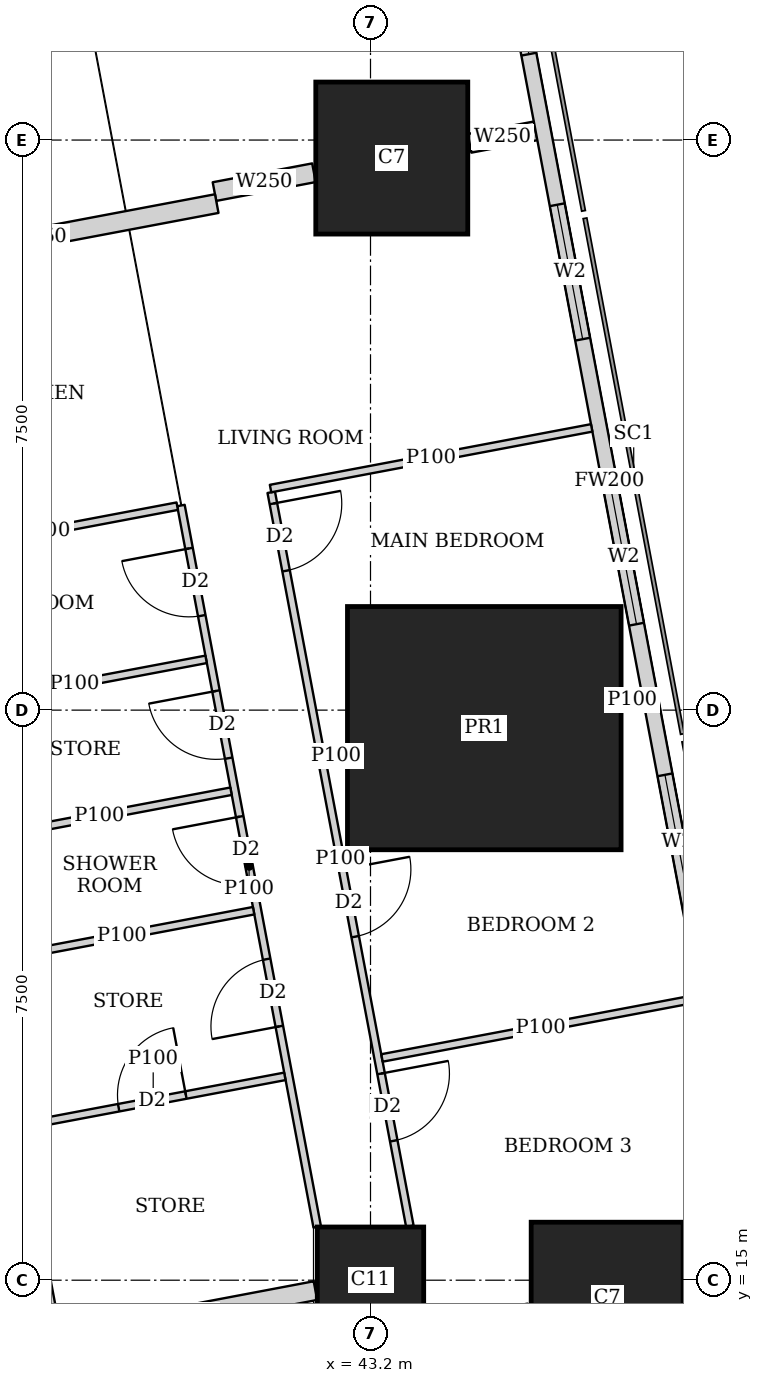
"""IFC4 building model, lengths in metres.
Left out: names, types, materials, properties, quantities, classifications, styles, units other than length and angle.
Written with IfcOpenShell. Run it as: python <this file> out.ifc"""

import sys

from ifc_helpers import new_model, si_unit, direction, frame, frame_2d, origin, origin_2d, place, context, subcontext, project, spatial, rectangle, extrude, element, fill, save


model = new_model("IFC4")
c1 = context("Model", 3, precision=1e-05, world=origin(), true_north=direction((0.0, 1.0)))
c2 = subcontext(c1, "Body", "Model", "MODEL_VIEW")
j1 = project(units=[si_unit("LENGTHUNIT", "METRE"), si_unit("PLANEANGLEUNIT", "RADIAN")], contexts=[c1])
p1 = place(None, origin())
s1 = spatial("IfcSite", under=j1, at=p1, CompositionType="ELEMENT")
p2 = place(p1, origin())
s2 = spatial("IfcBuilding", under=s1, at=p2, CompositionType="ELEMENT")
p3 = place(p2, frame((0.0, 0.0, 274.1)))
s3 = spatial("IfcBuildingStorey", under=s2, at=p3, CompositionType="ELEMENT", Elevation=274.1)
p4 = place(p3, frame((43.2, 15.0, 0.0), z_axis=(0.0, 0.0, 1.0), x_axis=(1.0, 0.0, 0.0)))
e1 = element("IfcColumn", 1, at=p4, inside=s3, PredefinedType="COLUMN", context=c2, shape_type="SweptSolid", body=[
    extrude(rectangle(XDim=1.4, YDim=1.4, at=origin_2d()), origin(), (0.0, 0.0, 1.0), 3.75),
])
p5 = place(p3, frame((46.314, 14.763, 0.0), z_axis=(0.0, 0.0, 1.0), x_axis=(1.0, 0.0, 0.0)))
e2 = element("IfcColumn", 2, at=p5, inside=s3, PredefinedType="COLUMN", context=c2, shape_type="SweptSolid", body=[
    extrude(rectangle(XDim=2.0, YDim=2.0, at=origin_2d()), origin(), (0.0, 0.0, 1.0), 3.75),
])
p6 = place(p3, frame((44.697, 22.263, 0.0), z_axis=(0.0, 0.0, 1.0), x_axis=(1.0, 0.0, 0.0)))
e3 = element("IfcColumn", 3, at=p6, inside=s3, PredefinedType="COLUMN", context=c2, shape_type="SweptSolid", body=[
    extrude(rectangle(XDim=3.6, YDim=3.2, at=origin_2d()), origin(), (0.0, 0.0, 1.0), 3.75),
])
p7 = place(p3, frame((43.48, 29.763, 0.0), z_axis=(0.0, 0.0, 1.0), x_axis=(1.0, 0.0, 0.0)))
e4 = element("IfcColumn", 4, at=p7, inside=s3, PredefinedType="COLUMN", context=c2, shape_type="SweptSolid", body=[
    extrude(rectangle(XDim=2.0, YDim=2.0, at=origin_2d()), origin(), (0.0, 0.0, 1.0), 3.75),
])
p8 = place(p3, frame((49.684, 7.832, 0.0), z_axis=(0.0, 0.0, 1.0), x_axis=(-0.185616669694, 0.982622232565, 0.0)))
e5 = element("IfcWall", 5, at=p8, inside=s3, PredefinedType="SOLIDWALL", context=c2, shape_type="SweptSolid", body=[
    extrude(rectangle(XDim=36.0, YDim=0.2, at=frame_2d((18.0, 0.0))), origin(), (0.0, 0.0, 1.0), 3.5),
])
p9 = place(p8, frame((2.518, 0.0, 0.9)))
e6 = element("IfcOpeningElement", 6, at=p9, cuts=e5, PredefinedType="OPENING", context=c2, shape_type="SweptSolid", body=[
    extrude(rectangle(XDim=2.4, YDim=1.5, at=frame_2d((1.2, 0.75))), frame((0.0, 0.11, 0.0), z_axis=(0.0, -1.0, 0.0), x_axis=(1.0, 0.0, 0.0)), (0.0, 0.0, 1.0), 0.22),
])
p10 = place(p8, frame((8.444, 0.0, 0.9)))
e7 = element("IfcOpeningElement", 7, at=p10, cuts=e5, PredefinedType="OPENING", context=c2, shape_type="SweptSolid", body=[
    extrude(rectangle(XDim=1.8, YDim=1.5, at=frame_2d((0.9, 0.75))), frame((0.0, 0.11, 0.0), z_axis=(0.0, -1.0, 0.0), x_axis=(1.0, 0.0, 0.0)), (0.0, 0.0, 1.0), 0.22),
])
p11 = place(p8, frame((12.261, 0.0, 0.9)))
e8 = element("IfcOpeningElement", 8, at=p11, cuts=e5, PredefinedType="OPENING", context=c2, shape_type="SweptSolid", body=[
    extrude(rectangle(XDim=1.8, YDim=1.5, at=frame_2d((0.9, 0.75))), frame((0.0, 0.11, 0.0), z_axis=(0.0, -1.0, 0.0), x_axis=(1.0, 0.0, 0.0)), (0.0, 0.0, 1.0), 0.22),
])
p12 = place(p8, frame((16.078, 0.0, 0.9)))
e9 = element("IfcOpeningElement", 9, at=p12, cuts=e5, PredefinedType="OPENING", context=c2, shape_type="SweptSolid", body=[
    extrude(rectangle(XDim=1.8, YDim=1.5, at=frame_2d((0.9, 0.75))), frame((0.0, 0.11, 0.0), z_axis=(0.0, -1.0, 0.0), x_axis=(1.0, 0.0, 0.0)), (0.0, 0.0, 1.0), 0.22),
])
p13 = place(p8, frame((19.894, 0.0, 0.9)))
e10 = element("IfcOpeningElement", 10, at=p13, cuts=e5, PredefinedType="OPENING", context=c2, shape_type="SweptSolid", body=[
    extrude(rectangle(XDim=1.8, YDim=1.5, at=frame_2d((0.9, 0.75))), frame((0.0, 0.11, 0.0), z_axis=(0.0, -1.0, 0.0), x_axis=(1.0, 0.0, 0.0)), (0.0, 0.0, 1.0), 0.22),
])
p14 = place(p8, frame((23.71, 0.0, 0.9)))
e11 = element("IfcOpeningElement", 11, at=p14, cuts=e5, PredefinedType="OPENING", context=c2, shape_type="SweptSolid", body=[
    extrude(rectangle(XDim=1.8, YDim=1.5, at=frame_2d((0.9, 0.75))), frame((0.0, 0.11, 0.0), z_axis=(0.0, -1.0, 0.0), x_axis=(1.0, 0.0, 0.0)), (0.0, 0.0, 1.0), 0.22),
])
p15 = place(p8, frame((27.526, 0.0, 0.9)))
e12 = element("IfcOpeningElement", 12, at=p15, cuts=e5, PredefinedType="OPENING", context=c2, shape_type="SweptSolid", body=[
    extrude(rectangle(XDim=1.8, YDim=1.5, at=frame_2d((0.9, 0.75))), frame((0.0, 0.11, 0.0), z_axis=(0.0, -1.0, 0.0), x_axis=(1.0, 0.0, 0.0)), (0.0, 0.0, 1.0), 0.22),
])
p16 = place(p8, frame((32.046, 0.0, 0.9)))
e13 = element("IfcOpeningElement", 13, at=p16, cuts=e5, PredefinedType="OPENING", context=c2, shape_type="SweptSolid", body=[
    extrude(rectangle(XDim=1.8, YDim=1.5, at=frame_2d((0.9, 0.75))), frame((0.0, 0.11, 0.0), z_axis=(0.0, -1.0, 0.0), x_axis=(1.0, 0.0, 0.0)), (0.0, 0.0, 1.0), 0.22),
])
p17 = place(p3, frame((33.781, 42.186, 0.0), z_axis=(0.0, 0.0, 1.0), x_axis=(0.185593518645, -0.9826266055, 0.0)))
e14 = element("IfcWall", 14, at=p17, inside=s3, PredefinedType="SOLIDWALL", context=c2, shape_type="SweptSolid", body=[
    extrude(rectangle(XDim=35.961, YDim=0.15, at=frame_2d((17.98, 0.0))), origin(), (0.0, 0.0, 1.0), 2.5),
])
p18 = place(p17, frame((11.76, 0.0, 0.0)))
e15 = element("IfcOpeningElement", 15, at=p18, cuts=e14, PredefinedType="OPENING", context=c2, shape_type="SweptSolid", body=[
    extrude(rectangle(XDim=1.0, YDim=2.1, at=frame_2d((0.5, 1.05))), frame((0.0, 0.085, 0.0), z_axis=(0.0, -1.0, 0.0), x_axis=(1.0, 0.0, 0.0)), (0.0, 0.0, 1.0), 0.17),
])
p19 = place(p17, frame((15.576, 0.0, 0.0)))
e16 = element("IfcOpeningElement", 16, at=p19, cuts=e14, PredefinedType="OPENING", context=c2, shape_type="SweptSolid", body=[
    extrude(rectangle(XDim=1.0, YDim=2.1, at=frame_2d((0.5, 1.05))), frame((0.0, 0.085, 0.0), z_axis=(0.0, -1.0, 0.0), x_axis=(1.0, 0.0, 0.0)), (0.0, 0.0, 1.0), 0.17),
])
p20 = place(p17, frame((30.502, 0.0, 0.0)))
e17 = element("IfcOpeningElement", 17, at=p20, cuts=e14, PredefinedType="OPENING", context=c2, shape_type="SweptSolid", body=[
    extrude(rectangle(XDim=1.0, YDim=2.1, at=frame_2d((0.5, 1.05))), frame((0.0, 0.085, 0.0), z_axis=(0.0, -1.0, 0.0), x_axis=(1.0, 0.0, 0.0)), (0.0, 0.0, 1.0), 0.17),
])
p21 = place(p3, frame((41.894, 25.366, 0.0), z_axis=(0.0, 0.0, 1.0), x_axis=(0.185612905165, -0.982622943675, 0.0)))
e18 = element("IfcWall", 18, at=p21, inside=s3, PredefinedType="PARTITIONING", context=c2, shape_type="SweptSolid", body=[
    extrude(rectangle(XDim=9.827, YDim=0.1, at=frame_2d((4.913, 0.0))), origin(), (0.0, 0.0, 1.0), 2.5),
])
p22 = place(p21, frame((0.151, 0.0, 0.0)))
e19 = element("IfcOpeningElement", 19, at=p22, cuts=e18, PredefinedType="OPENING", context=c2, shape_type="SweptSolid", body=[
    extrude(rectangle(XDim=0.9, YDim=2.1, at=frame_2d((0.45, 1.05))), frame((0.0, 0.06, 0.0), z_axis=(0.0, -1.0, 0.0), x_axis=(1.0, 0.0, 0.0)), (0.0, 0.0, 1.0), 0.12),
])
p23 = place(p21, frame((5.05, 0.0, 0.0)))
e20 = element("IfcOpeningElement", 20, at=p23, cuts=e18, PredefinedType="OPENING", context=c2, shape_type="SweptSolid", body=[
    extrude(rectangle(XDim=0.9, YDim=2.1, at=frame_2d((0.45, 1.05))), frame((0.0, 0.06, 0.0), z_axis=(0.0, -1.0, 0.0), x_axis=(1.0, 0.0, 0.0)), (0.0, 0.0, 1.0), 0.12),
])
p24 = place(p21, frame((7.783, 0.0, 0.0)))
e21 = element("IfcOpeningElement", 21, at=p24, cuts=e18, PredefinedType="OPENING", context=c2, shape_type="SweptSolid", body=[
    extrude(rectangle(XDim=0.9, YDim=2.1, at=frame_2d((0.45, 1.05))), frame((0.0, 0.06, 0.0), z_axis=(0.0, -1.0, 0.0), x_axis=(1.0, 0.0, 0.0)), (0.0, 0.0, 1.0), 0.12),
])
p25 = place(p3, frame((40.706, 25.192, 0.0), z_axis=(0.0, 0.0, 1.0), x_axis=(0.185629824463, -0.982619747547, 0.0)))
e22 = element("IfcWall", 22, at=p25, inside=s3, PredefinedType="PARTITIONING", context=c2, shape_type="SweptSolid", body=[
    extrude(rectangle(XDim=9.659, YDim=0.1, at=frame_2d((4.83, 0.0))), origin(), (0.0, 0.0, 1.0), 2.5),
])
p26 = place(p25, frame((0.575, 0.0, 0.0)))
e23 = element("IfcOpeningElement", 23, at=p26, cuts=e22, PredefinedType="OPENING", context=c2, shape_type="SweptSolid", body=[
    extrude(rectangle(XDim=0.9, YDim=2.1, at=frame_2d((0.45, 1.05))), frame((0.0, 0.06, 0.0), z_axis=(0.0, -1.0, 0.0), x_axis=(1.0, 0.0, 0.0)), (0.0, 0.0, 1.0), 0.12),
])
p27 = place(p25, frame((4.166, 0.0, 0.0)))
e24 = element("IfcOpeningElement", 24, at=p27, cuts=e22, PredefinedType="OPENING", context=c2, shape_type="SweptSolid", body=[
    extrude(rectangle(XDim=0.9, YDim=2.1, at=frame_2d((0.45, 1.05))), frame((0.0, 0.06, 0.0), z_axis=(0.0, -1.0, 0.0), x_axis=(1.0, 0.0, 0.0)), (0.0, 0.0, 1.0), 0.12),
])
p28 = place(p25, frame((2.483, 0.0, 0.0)))
e25 = element("IfcOpeningElement", 25, at=p28, cuts=e22, PredefinedType="OPENING", context=c2, shape_type="SweptSolid", body=[
    extrude(rectangle(XDim=0.9, YDim=2.1, at=frame_2d((0.45, 1.05))), frame((0.0, 0.06, 0.0), z_axis=(0.0, -1.0, 0.0), x_axis=(1.0, 0.0, 0.0)), (0.0, 0.0, 1.0), 0.12),
])
p29 = place(p25, frame((6.074, 0.0, 0.0)))
e26 = element("IfcOpeningElement", 26, at=p29, cuts=e22, PredefinedType="OPENING", context=c2, shape_type="SweptSolid", body=[
    extrude(rectangle(XDim=0.9, YDim=2.1, at=frame_2d((0.45, 1.05))), frame((0.0, 0.06, 0.0), z_axis=(0.0, -1.0, 0.0), x_axis=(1.0, 0.0, 0.0)), (0.0, 0.0, 1.0), 0.12),
])
p30 = place(p3, frame((46.11, 26.213, 0.0), z_axis=(0.0, 0.0, 1.0), x_axis=(-0.982633535512, -0.185556823879, 0.0)))
e27 = element("IfcWall", 27, at=p30, inside=s3, PredefinedType="PARTITIONING", context=c2, shape_type="SweptSolid", body=[
    extrude(rectangle(XDim=4.3, YDim=0.1, at=frame_2d((2.15, 0.0))), origin(), (0.0, 0.0, 1.0), 2.5),
])
p31 = place(p3, frame((46.782, 22.657, 0.0), z_axis=(0.0, 0.0, 1.0), x_axis=(-0.982574553168, -0.185868898601, 0.0)))
e28 = element("IfcWall", 28, at=p31, inside=s3, PredefinedType="PARTITIONING", context=c2, shape_type="SweptSolid", body=[
    extrude(rectangle(XDim=0.28, YDim=0.1, at=frame_2d((0.14, 0.0))), origin(), (0.0, 0.0, 1.0), 3.5),
])
p32 = place(p3, frame((42.887, 21.921, 0.0), z_axis=(0.0, 0.0, 1.0), x_axis=(-0.982688058078, -0.185267861514, 0.0)))
e29 = element("IfcWall", 29, at=p32, inside=s3, PredefinedType="PARTITIONING", context=c2, shape_type="SweptSolid", body=[
    extrude(rectangle(XDim=0.286, YDim=0.1, at=frame_2d((0.143, 0.0))), origin(), (0.0, 0.0, 1.0), 2.5),
])
p33 = place(p3, frame((47.527, 18.712, 0.0), z_axis=(0.0, 0.0, 1.0), x_axis=(-0.982665405803, -0.185387972203, 0.0)))
e30 = element("IfcWall", 30, at=p33, inside=s3, PredefinedType="PARTITIONING", context=c2, shape_type="SweptSolid", body=[
    extrude(rectangle(XDim=4.25, YDim=0.1, at=frame_2d((2.125, 0.0))), origin(), (0.0, 0.0, 1.0), 2.5),
])
p34 = place(p3, frame((40.657, 25.183, 0.0), z_axis=(0.0, 0.0, 1.0), x_axis=(-0.982585626838, -0.185810349366, 0.0)))
e31 = element("IfcWall", 31, at=p34, inside=s3, PredefinedType="PARTITIONING", context=c2, shape_type="SweptSolid", body=[
    extrude(rectangle(XDim=3.525, YDim=0.1, at=frame_2d((1.763, 0.0))), origin(), (0.0, 0.0, 1.0), 3.5),
])
p35 = place(p3, frame((41.365, 21.433, 0.0), z_axis=(0.0, 0.0, 1.0), x_axis=(-0.982638553676, -0.185530247748, 0.0)))
e32 = element("IfcWall", 32, at=p35, inside=s3, PredefinedType="PARTITIONING", context=c2, shape_type="SweptSolid", body=[
    extrude(rectangle(XDim=3.525, YDim=0.1, at=frame_2d((1.763, 0.0))), origin(), (0.0, 0.0, 1.0), 3.5),
])
p36 = place(p3, frame((42.073, 17.682, 0.0), z_axis=(0.0, 0.0, 1.0), x_axis=(-0.98265117712, -0.185463376723, 0.0)))
e33 = element("IfcWall", 33, at=p36, inside=s3, PredefinedType="PARTITIONING", context=c2, shape_type="SweptSolid", body=[
    extrude(rectangle(XDim=3.525, YDim=0.1, at=frame_2d((1.763, 0.0))), origin(), (0.0, 0.0, 1.0), 3.5),
])
p37 = place(p36, frame((1.325, 0.0, 0.0)))
e34 = element("IfcOpeningElement", 34, at=p37, cuts=e33, PredefinedType="OPENING", context=c2, shape_type="SweptSolid", body=[
    extrude(rectangle(XDim=0.9, YDim=2.1, at=frame_2d((0.45, 1.05))), frame((0.0, 0.06, 0.0), z_axis=(0.0, -1.0, 0.0), x_axis=(1.0, 0.0, 0.0)), (0.0, 0.0, 1.0), 0.12),
])
p38 = place(p3, frame((41.037, 23.168, 0.0), z_axis=(0.0, 0.0, 1.0), x_axis=(-0.982638553676, -0.185530247748, 0.0)))
e35 = element("IfcWall", 35, at=p38, inside=s3, PredefinedType="PARTITIONING", context=c2, shape_type="SweptSolid", body=[
    extrude(rectangle(XDim=3.525, YDim=0.1, at=frame_2d((1.763, 0.0))), origin(), (0.0, 0.0, 1.0), 2.5),
])
p39 = place(p3, frame((41.662, 19.861, 0.0), z_axis=(0.0, 0.0, 1.0), x_axis=(-0.982588017646, -0.185797706064, 0.0)))
e36 = element("IfcWall", 36, at=p39, inside=s3, PredefinedType="PARTITIONING", context=c2, shape_type="SweptSolid", body=[
    extrude(rectangle(XDim=3.525, YDim=0.1, at=frame_2d((1.763, 0.0))), origin(), (0.0, 0.0, 1.0), 3.5),
])
p40 = place(p3, frame((45.372, 30.121, 0.0), z_axis=(0.0, 0.0, 1.0), x_axis=(-0.982608419258, -0.185689780017, 0.0)))
e37 = element("IfcWall", 37, at=p40, inside=s3, PredefinedType="SOLIDWALL", context=c2, shape_type="SweptSolid", body=[
    extrude(rectangle(XDim=0.884, YDim=0.25, at=frame_2d((0.442, 0.0))), origin(), (0.0, 0.0, 1.0), 3.5),
])
p41 = place(p3, frame((42.456, 29.57, 0.0), z_axis=(0.0, 0.0, 1.0), x_axis=(-0.982517742323, -0.18616897169, 0.0)))
e38 = element("IfcWall", 38, at=p41, inside=s3, PredefinedType="SOLIDWALL", context=c2, shape_type="SweptSolid", body=[
    extrude(rectangle(XDim=1.332, YDim=0.25, at=frame_2d((0.666, 0.0))), origin(), (0.0, 0.0, 1.0), 2.5),
])
p42 = place(p3, frame((41.177, 29.164, 0.0), z_axis=(0.0, 0.0, 1.0), x_axis=(-0.982642846239, -0.185507511263, 0.0)))
e39 = element("IfcWall", 39, at=p42, inside=s3, PredefinedType="SOLIDWALL", context=c2, shape_type="SweptSolid", body=[
    extrude(rectangle(XDim=4.776, YDim=0.25, at=frame_2d((2.388, 0.0))), origin(), (0.0, 0.0, 1.0), 2.5),
])
p43 = place(p3, frame((42.476, 14.863, 0.0), z_axis=(0.0, 0.0, 1.0), x_axis=(-0.982603567712, -0.185715450942, 0.0)))
e40 = element("IfcWall", 40, at=p43, inside=s3, PredefinedType="SOLIDWALL", context=c2, shape_type="SweptSolid", body=[
    extrude(rectangle(XDim=3.398, YDim=0.25, at=frame_2d((1.699, 0.0))), origin(), (0.0, 0.0, 1.0), 3.5),
])
p44 = place(p11, origin())
e41 = element("IfcWindow", 41, at=p44, inside=s3, PartitioningType="SINGLE_PANEL", PredefinedType="WINDOW", context=c2, shape_type="SweptSolid", body=[
    extrude(rectangle(XDim=1.8, YDim=1.5, at=frame_2d((0.9, 0.75))), frame((0.0, 0.03, 0.0), z_axis=(0.0, -1.0, 0.0), x_axis=(1.0, 0.0, 0.0)), (0.0, 0.0, 1.0), 0.06),
])
fill(e8, e41)
p45 = place(p12, origin())
e42 = element("IfcWindow", 42, at=p45, inside=s3, PartitioningType="SINGLE_PANEL", PredefinedType="WINDOW", context=c2, shape_type="SweptSolid", body=[
    extrude(rectangle(XDim=1.8, YDim=1.5, at=frame_2d((0.9, 0.75))), frame((0.0, 0.03, 0.0), z_axis=(0.0, -1.0, 0.0), x_axis=(1.0, 0.0, 0.0)), (0.0, 0.0, 1.0), 0.06),
])
fill(e9, e42)
p46 = place(p13, origin())
e43 = element("IfcWindow", 43, at=p46, inside=s3, PartitioningType="SINGLE_PANEL", PredefinedType="WINDOW", context=c2, shape_type="SweptSolid", body=[
    extrude(rectangle(XDim=1.8, YDim=1.5, at=frame_2d((0.9, 0.75))), frame((0.0, 0.03, 0.0), z_axis=(0.0, -1.0, 0.0), x_axis=(1.0, 0.0, 0.0)), (0.0, 0.0, 1.0), 0.06),
])
fill(e10, e43)
p47 = place(p14, origin())
e44 = element("IfcWindow", 44, at=p47, inside=s3, PartitioningType="SINGLE_PANEL", PredefinedType="WINDOW", context=c2, shape_type="SweptSolid", body=[
    extrude(rectangle(XDim=1.8, YDim=1.5, at=frame_2d((0.9, 0.75))), frame((0.0, 0.03, 0.0), z_axis=(0.0, -1.0, 0.0), x_axis=(1.0, 0.0, 0.0)), (0.0, 0.0, 1.0), 0.06),
])
fill(e11, e44)
p48 = place(p22, origin())
e45 = element("IfcDoor", 45, at=p48, inside=s3, OperationType="SINGLE_SWING_LEFT", PredefinedType="DOOR", context=c2, shape_type="SweptSolid", body=[
    extrude(rectangle(XDim=0.9, YDim=2.1, at=frame_2d((0.45, 1.05))), frame((0.0, 0.025, 0.0), z_axis=(0.0, -1.0, 0.0), x_axis=(1.0, 0.0, 0.0)), (0.0, 0.0, 1.0), 0.05),
])
fill(e19, e45)
p49 = place(p23, origin())
e46 = element("IfcDoor", 46, at=p49, inside=s3, OperationType="SINGLE_SWING_LEFT", PredefinedType="DOOR", context=c2, shape_type="SweptSolid", body=[
    extrude(rectangle(XDim=0.9, YDim=2.1, at=frame_2d((0.45, 1.05))), frame((0.0, 0.025, 0.0), z_axis=(0.0, -1.0, 0.0), x_axis=(1.0, 0.0, 0.0)), (0.0, 0.0, 1.0), 0.05),
])
fill(e20, e46)
p50 = place(p24, origin())
e47 = element("IfcDoor", 47, at=p50, inside=s3, OperationType="SINGLE_SWING_LEFT", PredefinedType="DOOR", context=c2, shape_type="SweptSolid", body=[
    extrude(rectangle(XDim=0.9, YDim=2.1, at=frame_2d((0.45, 1.05))), frame((0.0, 0.025, 0.0), z_axis=(0.0, -1.0, 0.0), x_axis=(1.0, 0.0, 0.0)), (0.0, 0.0, 1.0), 0.05),
])
fill(e21, e47)
p51 = place(p26, origin())
e48 = element("IfcDoor", 48, at=p51, inside=s3, OperationType="SINGLE_SWING_RIGHT", PredefinedType="DOOR", context=c2, shape_type="SweptSolid", body=[
    extrude(rectangle(XDim=0.9, YDim=2.1, at=frame_2d((0.45, 1.05))), frame((0.0, 0.025, 0.0), z_axis=(0.0, -1.0, 0.0), x_axis=(1.0, 0.0, 0.0)), (0.0, 0.0, 1.0), 0.05),
])
fill(e23, e48)
p52 = place(p27, origin())
e49 = element("IfcDoor", 49, at=p52, inside=s3, OperationType="SINGLE_SWING_RIGHT", PredefinedType="DOOR", context=c2, shape_type="SweptSolid", body=[
    extrude(rectangle(XDim=0.9, YDim=2.1, at=frame_2d((0.45, 1.05))), frame((0.0, 0.025, 0.0), z_axis=(0.0, -1.0, 0.0), x_axis=(1.0, 0.0, 0.0)), (0.0, 0.0, 1.0), 0.05),
])
fill(e24, e49)
p53 = place(p28, origin())
e50 = element("IfcDoor", 50, at=p53, inside=s3, OperationType="SINGLE_SWING_RIGHT", PredefinedType="DOOR", context=c2, shape_type="SweptSolid", body=[
    extrude(rectangle(XDim=0.9, YDim=2.1, at=frame_2d((0.45, 1.05))), frame((0.0, 0.025, 0.0), z_axis=(0.0, -1.0, 0.0), x_axis=(1.0, 0.0, 0.0)), (0.0, 0.0, 1.0), 0.05),
])
fill(e25, e50)
p54 = place(p29, origin())
e51 = element("IfcDoor", 51, at=p54, inside=s3, OperationType="SINGLE_SWING_LEFT", PredefinedType="DOOR", context=c2, shape_type="SweptSolid", body=[
    extrude(rectangle(XDim=0.9, YDim=2.1, at=frame_2d((0.45, 1.05))), frame((0.0, 0.025, 0.0), z_axis=(0.0, -1.0, 0.0), x_axis=(1.0, 0.0, 0.0)), (0.0, 0.0, 1.0), 0.05),
])
fill(e26, e51)
p55 = place(p37, origin())
e52 = element("IfcDoor", 52, at=p55, inside=s3, OperationType="SINGLE_SWING_RIGHT", PredefinedType="DOOR", context=c2, shape_type="SweptSolid", body=[
    extrude(rectangle(XDim=0.9, YDim=2.1, at=frame_2d((0.45, 1.05))), frame((0.0, 0.025, 0.0), z_axis=(0.0, -1.0, 0.0), x_axis=(1.0, 0.0, 0.0)), (0.0, 0.0, 1.0), 0.05),
])
fill(e34, e52)
save(model, sys.argv[1])
